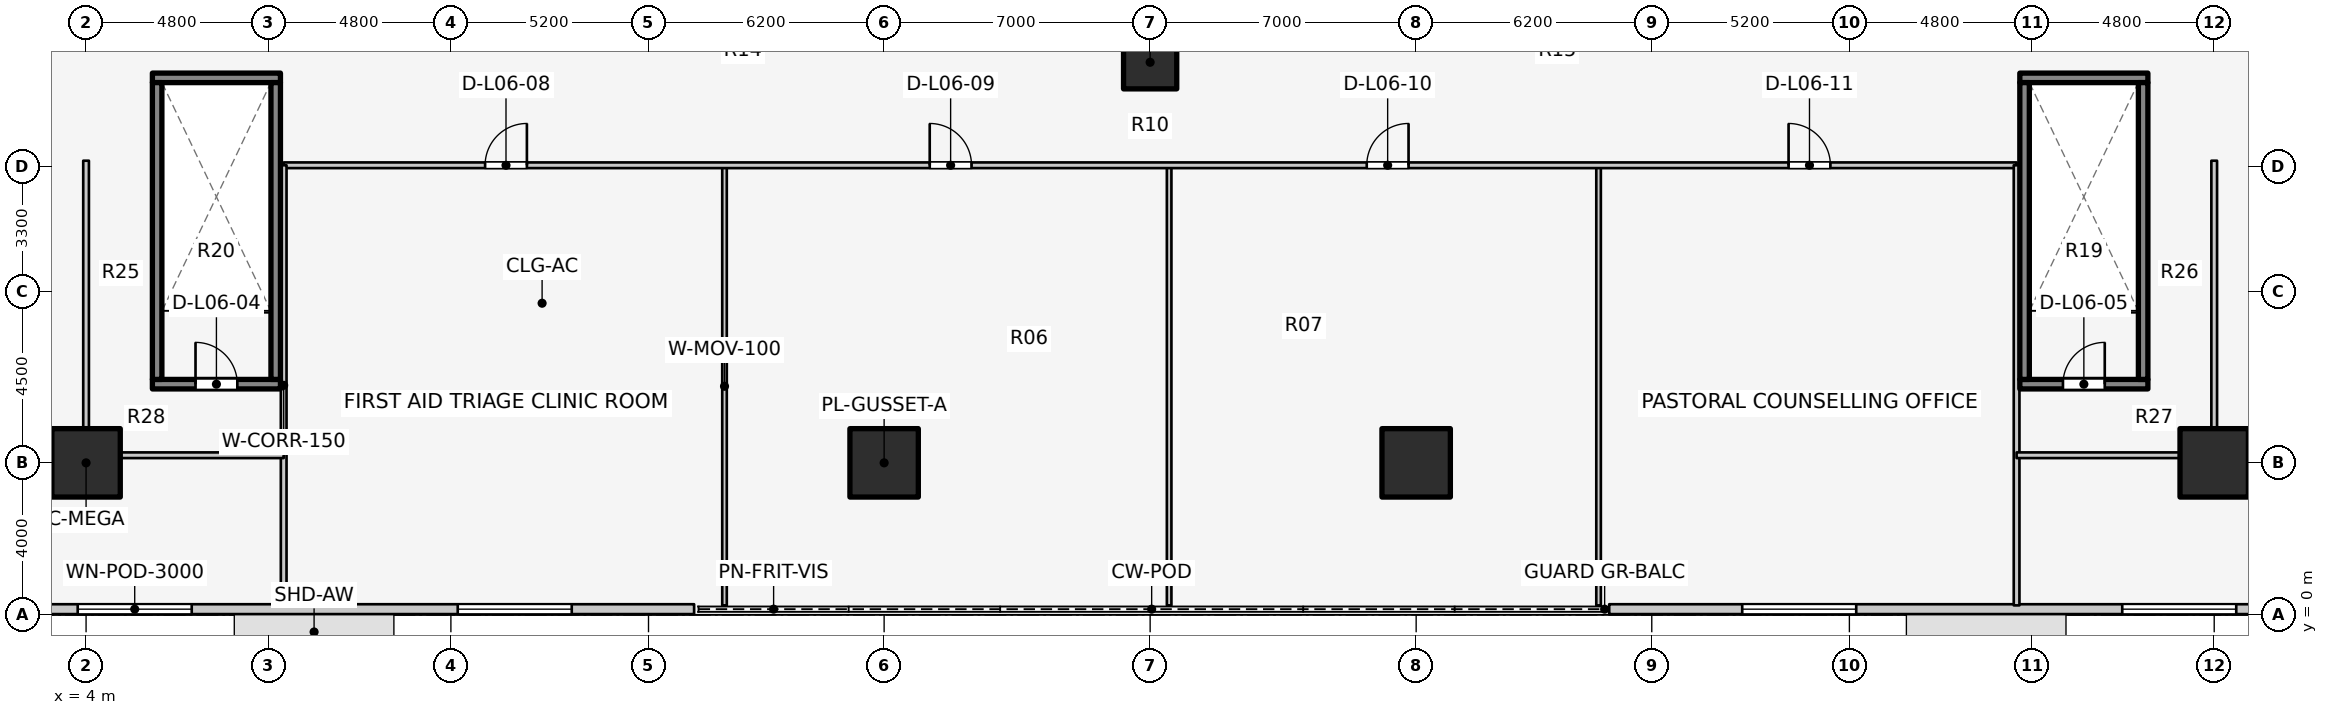
"""IFC4 building model, lengths in metres.
Left out: names, types, materials, properties, quantities, classifications, styles, units other than length and angle.
Written with IfcOpenShell. Run it as: python <this file> out.ifc"""

import sys

from ifc_helpers import new_model, si_unit, direction, frame, frame_2d, origin, origin_2d, place, context, subcontext, project, spatial, rectangle, extrude, element, fill, save


model = new_model("IFC4")
c1 = context("Model", 3, precision=1e-05, world=origin(), true_north=direction((0.0, 1.0)))
c2 = subcontext(c1, "Body", "Model", "MODEL_VIEW")
j1 = project(units=[si_unit("LENGTHUNIT", "METRE"), si_unit("PLANEANGLEUNIT", "RADIAN")], contexts=[c1])
p1 = place(None, origin())
s1 = spatial("IfcSite", under=j1, at=p1, CompositionType="ELEMENT")
p2 = place(p1, origin())
s2 = spatial("IfcBuilding", under=s1, at=p2, CompositionType="ELEMENT")
p3 = place(p2, frame((0.0, 0.0, 23.0)))
s3 = spatial("IfcBuildingStorey", under=s2, at=p3, CompositionType="ELEMENT", Elevation=23.0)
p4 = place(p3, frame((5.745, 6.07, 0.0), z_axis=(0.0, 0.0, 1.0), x_axis=(1.0, 0.0, 0.0)))
e1 = element("IfcWall", 1, at=p4, inside=s3, PredefinedType="SOLIDWALL", context=c2, shape_type="SweptSolid", body=[
    extrude(rectangle(XDim=3.37, YDim=0.25, at=frame_2d((1.685, 0.0))), origin(), (0.0, 0.0, 1.0), 4.6),
])
p5 = place(p4, frame((1.135, 0.0, 0.0)))
e2 = element("IfcOpeningElement", 2, at=p5, cuts=e1, PredefinedType="OPENING", context=c2, shape_type="SweptSolid", body=[
    extrude(rectangle(XDim=1.1, YDim=2.1, at=frame_2d((0.55, 1.05))), frame((0.0, 0.135, 0.0), z_axis=(0.0, -1.0, 0.0), x_axis=(1.0, 0.0, 0.0)), (0.0, 0.0, 1.0), 0.27),
])
p6 = place(p3, frame((5.745, 14.13, 0.0), z_axis=(0.0, 0.0, 1.0), x_axis=(1.0, 0.0, 0.0)))
e3 = element("IfcWall", 3, at=p6, inside=s3, PredefinedType="SOLIDWALL", context=c2, shape_type="SweptSolid", body=[
    extrude(rectangle(XDim=3.37, YDim=0.25, at=frame_2d((1.685, 0.0))), origin(), (0.0, 0.0, 1.0), 4.6),
])
for number, where, z_axis, x_axis in (
    (4, (5.87, 6.195, 0.0), (0.0, 0.0, 1.0), (0.0, 1.0, 0.0)),
    (5, (8.99, 6.195, 0.0), (0.0, 0.0, 1.0), (0.0, 1.0, 0.0)),
):
    element("IfcWall", number, at=place(p3, frame(where, z_axis=z_axis, x_axis=x_axis)), inside=s3, PredefinedType="SOLIDWALL", context=c2, shape_type="SweptSolid", body=[
        extrude(rectangle(XDim=7.81, YDim=0.25, at=frame_2d((3.905, 0.0))), origin(), (0.0, 0.0, 1.0), 4.6),
    ])
p7 = place(p3, frame((54.885, 6.07, 0.0), z_axis=(0.0, 0.0, 1.0), x_axis=(1.0, 0.0, 0.0)))
e6 = element("IfcWall", 6, at=p7, inside=s3, PredefinedType="SOLIDWALL", context=c2, shape_type="SweptSolid", body=[
    extrude(rectangle(XDim=3.37, YDim=0.25, at=frame_2d((1.685, 0.0))), origin(), (0.0, 0.0, 1.0), 4.6),
])
p8 = place(p7, frame((1.135, 0.0, 0.0)))
e7 = element("IfcOpeningElement", 7, at=p8, cuts=e6, PredefinedType="OPENING", context=c2, shape_type="SweptSolid", body=[
    extrude(rectangle(XDim=1.1, YDim=2.1, at=frame_2d((0.55, 1.05))), frame((0.0, 0.135, 0.0), z_axis=(0.0, -1.0, 0.0), x_axis=(1.0, 0.0, 0.0)), (0.0, 0.0, 1.0), 0.27),
])
p9 = place(p3, frame((54.885, 14.13, 0.0), z_axis=(0.0, 0.0, 1.0), x_axis=(1.0, 0.0, 0.0)))
e8 = element("IfcWall", 8, at=p9, inside=s3, PredefinedType="SOLIDWALL", context=c2, shape_type="SweptSolid", body=[
    extrude(rectangle(XDim=3.37, YDim=0.25, at=frame_2d((1.685, 0.0))), origin(), (0.0, 0.0, 1.0), 4.6),
])
for number, where, z_axis, x_axis in (
    (9, (55.01, 6.195, 0.0), (0.0, 0.0, 1.0), (0.0, 1.0, 0.0)),
    (10, (58.13, 6.195, 0.0), (0.0, 0.0, 1.0), (0.0, 1.0, 0.0)),
):
    element("IfcWall", number, at=place(p3, frame(where, z_axis=z_axis, x_axis=x_axis)), inside=s3, PredefinedType="SOLIDWALL", context=c2, shape_type="SweptSolid", body=[
        extrude(rectangle(XDim=7.81, YDim=0.25, at=frame_2d((3.905, 0.0))), origin(), (0.0, 0.0, 1.0), 4.6),
    ])
for number, where, z_axis, x_axis in (
    (11, (4.0, 4.0, 0.0), (0.0, 0.0, 1.0), (1.0, 0.0, 0.0)),
    (12, (25.0, 4.0, 0.0), (0.0, 0.0, 1.0), (1.0, 0.0, 0.0)),
    (13, (39.0, 4.0, 0.0), (0.0, 0.0, 1.0), (1.0, 0.0, 0.0)),
    (14, (60.0, 4.0, 0.0), (0.0, 0.0, 1.0), (1.0, 0.0, 0.0)),
):
    element("IfcColumn", number, at=place(p3, frame(where, z_axis=z_axis, x_axis=x_axis)), inside=s3, PredefinedType="COLUMN", context=c2, shape_type="SweptSolid", body=[
        extrude(rectangle(XDim=1.8, YDim=1.8, at=origin_2d()), origin(), (0.0, 0.0, 1.0), 4.6),
    ])
p10 = place(p3, frame((32.0, 14.54, 0.0), z_axis=(0.0, 0.0, 1.0), x_axis=(1.0, 0.0, 0.0)))
e15 = element("IfcColumn", 15, at=p10, inside=s3, PredefinedType="COLUMN", context=c2, shape_type="SweptSolid", body=[
    extrude(rectangle(XDim=1.4, YDim=1.4, at=origin_2d()), origin(), (0.0, 0.0, 1.0), 4.6),
])
p11 = place(p3, frame((0.28, 0.15, 0.0), z_axis=(0.0, 0.0, 1.0), x_axis=(1.0, 0.0, 0.0)))
e16 = element("IfcWall", 16, at=p11, inside=s3, PredefinedType="STANDARD", context=c2, shape_type="SweptSolid", body=[
    extrude(rectangle(XDim=19.72, YDim=0.26, at=frame_2d((9.86, 0.0))), origin(), (0.0, 0.0, 1.0), 4.1),
])
p12 = place(p11, frame((3.5, 0.0, 0.9)))
e17 = element("IfcOpeningElement", 17, at=p12, cuts=e16, PredefinedType="OPENING", context=c2, shape_type="SweptSolid", body=[
    extrude(rectangle(XDim=3.0, YDim=2.4, at=frame_2d((1.5, 1.2))), frame((0.0, 0.14, 0.0), z_axis=(0.0, -1.0, 0.0), x_axis=(1.0, 0.0, 0.0)), (0.0, 0.0, 1.0), 0.28),
])
p13 = place(p11, frame((13.5, 0.0, 0.9)))
e18 = element("IfcOpeningElement", 18, at=p13, cuts=e16, PredefinedType="OPENING", context=c2, shape_type="SweptSolid", body=[
    extrude(rectangle(XDim=3.0, YDim=2.4, at=frame_2d((1.5, 1.2))), frame((0.0, 0.14, 0.0), z_axis=(0.0, -1.0, 0.0), x_axis=(1.0, 0.0, 0.0)), (0.0, 0.0, 1.0), 0.28),
])
p14 = place(p3, frame((44.08, 0.15, 0.0), z_axis=(0.0, 0.0, 1.0), x_axis=(1.0, 0.0, 0.0)))
e19 = element("IfcWall", 19, at=p14, inside=s3, PredefinedType="STANDARD", context=c2, shape_type="SweptSolid", body=[
    extrude(rectangle(XDim=19.64, YDim=0.26, at=frame_2d((9.82, 0.0))), origin(), (0.0, 0.0, 1.0), 4.1),
])
p15 = place(p14, frame((3.5, 0.0, 0.9)))
e20 = element("IfcOpeningElement", 20, at=p15, cuts=e19, PredefinedType="OPENING", context=c2, shape_type="SweptSolid", body=[
    extrude(rectangle(XDim=3.0, YDim=2.4, at=frame_2d((1.5, 1.2))), frame((0.0, 0.14, 0.0), z_axis=(0.0, -1.0, 0.0), x_axis=(1.0, 0.0, 0.0)), (0.0, 0.0, 1.0), 0.28),
])
p16 = place(p14, frame((13.5, 0.0, 0.9)))
e21 = element("IfcOpeningElement", 21, at=p16, cuts=e19, PredefinedType="OPENING", context=c2, shape_type="SweptSolid", body=[
    extrude(rectangle(XDim=3.0, YDim=2.4, at=frame_2d((1.5, 1.2))), frame((0.0, 0.14, 0.0), z_axis=(0.0, -1.0, 0.0), x_axis=(1.0, 0.0, 0.0)), (0.0, 0.0, 1.0), 0.28),
])
for number, where, z_axis, x_axis in (
    (22, (30.157, 15.157, 0.0), (0.0, 0.0, 1.0), (0.989, -0.149, 0.0)),
    (23, (32.0, 14.88, 0.0), (0.0, 0.0, 1.0), (0.989, 0.149, 0.0)),
):
    element("IfcWall", number, at=place(p3, frame(where, z_axis=z_axis, x_axis=x_axis)), inside=s3, PredefinedType="STANDARD", context=c2, shape_type="SweptSolid", body=[
        extrude(rectangle(XDim=1.864, YDim=0.23, at=frame_2d((0.932, 0.0))), origin(), (0.0, 0.0, 1.0), 2.67),
    ])
for number, where, z_axis, x_axis in (
    (24, (20.8, 0.25, 0.0), (0.0, 0.0, 1.0), (0.0, 1.0, 0.0)),
    (25, (32.5, 0.25, 0.0), (0.0, 0.0, 1.0), (0.0, 1.0, 0.0)),
    (26, (43.8, 0.25, 0.0), (0.0, 0.0, 1.0), (0.0, 1.0, 0.0)),
):
    element("IfcWall", number, at=place(p3, frame(where, z_axis=z_axis, x_axis=x_axis)), inside=s3, PredefinedType="MOVABLE", context=c2, shape_type="SweptSolid", body=[
        extrude(rectangle(XDim=11.53, YDim=0.12, at=frame_2d((5.765, 0.0))), origin(), (0.0, 0.0, 1.0), 2.67),
    ])
p17 = place(p3, frame((9.2, 11.83, 0.0), z_axis=(0.0, 0.0, 1.0), x_axis=(1.0, 0.0, 0.0)))
e27 = element("IfcWall", 27, at=p17, inside=s3, PredefinedType="PARTITIONING", context=c2, shape_type="SweptSolid", body=[
    extrude(rectangle(XDim=45.6, YDim=0.15, at=frame_2d((22.8, 0.0))), origin(), (0.0, 0.0, 1.0), 2.67),
])
p18 = place(p17, frame((5.3, 0.0, 0.0)))
e28 = element("IfcOpeningElement", 28, at=p18, cuts=e27, PredefinedType="OPENING", context=c2, shape_type="SweptSolid", body=[
    extrude(rectangle(XDim=1.1, YDim=2.1, at=frame_2d((0.55, 1.05))), frame((0.0, 0.085, 0.0), z_axis=(0.0, -1.0, 0.0), x_axis=(1.0, 0.0, 0.0)), (0.0, 0.0, 1.0), 0.17),
])
p19 = place(p17, frame((17.0, 0.0, 0.0)))
e29 = element("IfcOpeningElement", 29, at=p19, cuts=e27, PredefinedType="OPENING", context=c2, shape_type="SweptSolid", body=[
    extrude(rectangle(XDim=1.1, YDim=2.1, at=frame_2d((0.55, 1.05))), frame((0.0, 0.085, 0.0), z_axis=(0.0, -1.0, 0.0), x_axis=(1.0, 0.0, 0.0)), (0.0, 0.0, 1.0), 0.17),
])
p20 = place(p17, frame((28.5, 0.0, 0.0)))
e30 = element("IfcOpeningElement", 30, at=p20, cuts=e27, PredefinedType="OPENING", context=c2, shape_type="SweptSolid", body=[
    extrude(rectangle(XDim=1.1, YDim=2.1, at=frame_2d((0.55, 1.05))), frame((0.0, 0.085, 0.0), z_axis=(0.0, -1.0, 0.0), x_axis=(1.0, 0.0, 0.0)), (0.0, 0.0, 1.0), 0.17),
])
p21 = place(p17, frame((39.6, 0.0, 0.0)))
e31 = element("IfcOpeningElement", 31, at=p21, cuts=e27, PredefinedType="OPENING", context=c2, shape_type="SweptSolid", body=[
    extrude(rectangle(XDim=1.1, YDim=2.1, at=frame_2d((0.55, 1.05))), frame((0.0, 0.085, 0.0), z_axis=(0.0, -1.0, 0.0), x_axis=(1.0, 0.0, 0.0)), (0.0, 0.0, 1.0), 0.17),
])
for number, where, z_axis, x_axis in (
    (32, (9.2, 0.25, 0.0), (0.0, 0.0, 1.0), (0.0, 1.0, 0.0)),
    (33, (54.8, 0.25, 0.0), (0.0, 0.0, 1.0), (0.0, 1.0, 0.0)),
):
    element("IfcWall", number, at=place(p3, frame(where, z_axis=z_axis, x_axis=x_axis)), inside=s3, PredefinedType="PARTITIONING", context=c2, shape_type="SweptSolid", body=[
        extrude(rectangle(XDim=11.58, YDim=0.15, at=frame_2d((5.79, 0.0))), origin(), (0.0, 0.0, 1.0), 2.67),
    ])
p22 = place(p3, frame((4.0, 4.2, 0.0), z_axis=(0.0, 0.0, 1.0), x_axis=(0.0, 1.0, 0.0)))
e34 = element("IfcWall", 34, at=p22, inside=s3, PredefinedType="PARTITIONING", context=c2, shape_type="SweptSolid", body=[
    extrude(rectangle(XDim=7.75, YDim=0.15, at=frame_2d((3.875, 0.0))), origin(), (0.0, 0.0, 1.0), 2.67),
])
p23 = place(p3, frame((4.0, 4.2, 0.0), z_axis=(0.0, 0.0, 1.0), x_axis=(1.0, 0.0, 0.0)))
e35 = element("IfcWall", 35, at=p23, inside=s3, PredefinedType="PARTITIONING", context=c2, shape_type="SweptSolid", body=[
    extrude(rectangle(XDim=5.2, YDim=0.15, at=frame_2d((2.6, 0.0))), origin(), (0.0, 0.0, 1.0), 2.67),
])
p24 = place(p3, frame((60.0, 4.2, 0.0), z_axis=(0.0, 0.0, 1.0), x_axis=(0.0, 1.0, 0.0)))
e36 = element("IfcWall", 36, at=p24, inside=s3, PredefinedType="PARTITIONING", context=c2, shape_type="SweptSolid", body=[
    extrude(rectangle(XDim=7.75, YDim=0.15, at=frame_2d((3.875, 0.0))), origin(), (0.0, 0.0, 1.0), 2.67),
])
p25 = place(p3, frame((54.8, 4.2, 0.0), z_axis=(0.0, 0.0, 1.0), x_axis=(1.0, 0.0, 0.0)))
e37 = element("IfcWall", 37, at=p25, inside=s3, PredefinedType="PARTITIONING", context=c2, shape_type="SweptSolid", body=[
    extrude(rectangle(XDim=5.2, YDim=0.15, at=frame_2d((2.6, 0.0))), origin(), (0.0, 0.0, 1.0), 2.67),
])
p26 = place(p12, origin())
e38 = element("IfcWindow", 38, at=p26, inside=s3, PartitioningType="SINGLE_PANEL", PredefinedType="WINDOW", context=c2, shape_type="SweptSolid", body=[
    extrude(rectangle(XDim=3.0, YDim=2.4, at=frame_2d((1.5, 1.2))), frame((0.0, 0.03, 0.0), z_axis=(0.0, -1.0, 0.0), x_axis=(1.0, 0.0, 0.0)), (0.0, 0.0, 1.0), 0.06),
])
fill(e17, e38)
p27 = place(p13, origin())
e39 = element("IfcWindow", 39, at=p27, inside=s3, PartitioningType="SINGLE_PANEL", PredefinedType="WINDOW", context=c2, shape_type="SweptSolid", body=[
    extrude(rectangle(XDim=3.0, YDim=2.4, at=frame_2d((1.5, 1.2))), frame((0.0, 0.03, 0.0), z_axis=(0.0, -1.0, 0.0), x_axis=(1.0, 0.0, 0.0)), (0.0, 0.0, 1.0), 0.06),
])
fill(e18, e39)
p28 = place(p15, origin())
e40 = element("IfcWindow", 40, at=p28, inside=s3, PartitioningType="SINGLE_PANEL", PredefinedType="WINDOW", context=c2, shape_type="SweptSolid", body=[
    extrude(rectangle(XDim=3.0, YDim=2.4, at=frame_2d((1.5, 1.2))), frame((0.0, 0.03, 0.0), z_axis=(0.0, -1.0, 0.0), x_axis=(1.0, 0.0, 0.0)), (0.0, 0.0, 1.0), 0.06),
])
fill(e20, e40)
p29 = place(p16, origin())
e41 = element("IfcWindow", 41, at=p29, inside=s3, PartitioningType="SINGLE_PANEL", PredefinedType="WINDOW", context=c2, shape_type="SweptSolid", body=[
    extrude(rectangle(XDim=3.0, YDim=2.4, at=frame_2d((1.5, 1.2))), frame((0.0, 0.03, 0.0), z_axis=(0.0, -1.0, 0.0), x_axis=(1.0, 0.0, 0.0)), (0.0, 0.0, 1.0), 0.06),
])
fill(e21, e41)
p30 = place(p5, origin())
e42 = element("IfcDoor", 42, at=p30, inside=s3, OperationType="SINGLE_SWING_LEFT", PredefinedType="DOOR", context=c2, shape_type="SweptSolid", body=[
    extrude(rectangle(XDim=1.1, YDim=2.1, at=frame_2d((0.55, 1.05))), frame((0.0, 0.025, 0.0), z_axis=(0.0, -1.0, 0.0), x_axis=(1.0, 0.0, 0.0)), (0.0, 0.0, 1.0), 0.05),
])
fill(e2, e42)
p31 = place(p8, origin())
e43 = element("IfcDoor", 43, at=p31, inside=s3, OperationType="SINGLE_SWING_RIGHT", PredefinedType="DOOR", context=c2, shape_type="SweptSolid", body=[
    extrude(rectangle(XDim=1.1, YDim=2.1, at=frame_2d((0.55, 1.05))), frame((0.0, 0.025, 0.0), z_axis=(0.0, -1.0, 0.0), x_axis=(1.0, 0.0, 0.0)), (0.0, 0.0, 1.0), 0.05),
])
fill(e7, e43)
p32 = place(p18, origin())
e44 = element("IfcDoor", 44, at=p32, inside=s3, OperationType="SINGLE_SWING_RIGHT", PredefinedType="DOOR", context=c2, shape_type="SweptSolid", body=[
    extrude(rectangle(XDim=1.1, YDim=2.1, at=frame_2d((0.55, 1.05))), frame((0.0, 0.025, 0.0), z_axis=(0.0, -1.0, 0.0), x_axis=(1.0, 0.0, 0.0)), (0.0, 0.0, 1.0), 0.05),
])
fill(e28, e44)
p33 = place(p19, origin())
e45 = element("IfcDoor", 45, at=p33, inside=s3, OperationType="SINGLE_SWING_LEFT", PredefinedType="DOOR", context=c2, shape_type="SweptSolid", body=[
    extrude(rectangle(XDim=1.1, YDim=2.1, at=frame_2d((0.55, 1.05))), frame((0.0, 0.025, 0.0), z_axis=(0.0, -1.0, 0.0), x_axis=(1.0, 0.0, 0.0)), (0.0, 0.0, 1.0), 0.05),
])
fill(e29, e45)
p34 = place(p20, origin())
e46 = element("IfcDoor", 46, at=p34, inside=s3, OperationType="SINGLE_SWING_RIGHT", PredefinedType="DOOR", context=c2, shape_type="SweptSolid", body=[
    extrude(rectangle(XDim=1.1, YDim=2.1, at=frame_2d((0.55, 1.05))), frame((0.0, 0.025, 0.0), z_axis=(0.0, -1.0, 0.0), x_axis=(1.0, 0.0, 0.0)), (0.0, 0.0, 1.0), 0.05),
])
fill(e30, e46)
p35 = place(p21, origin())
e47 = element("IfcDoor", 47, at=p35, inside=s3, OperationType="SINGLE_SWING_LEFT", PredefinedType="DOOR", context=c2, shape_type="SweptSolid", body=[
    extrude(rectangle(XDim=1.1, YDim=2.1, at=frame_2d((0.55, 1.05))), frame((0.0, 0.025, 0.0), z_axis=(0.0, -1.0, 0.0), x_axis=(1.0, 0.0, 0.0)), (0.0, 0.0, 1.0), 0.05),
])
fill(e31, e47)
save(model, sys.argv[1])
